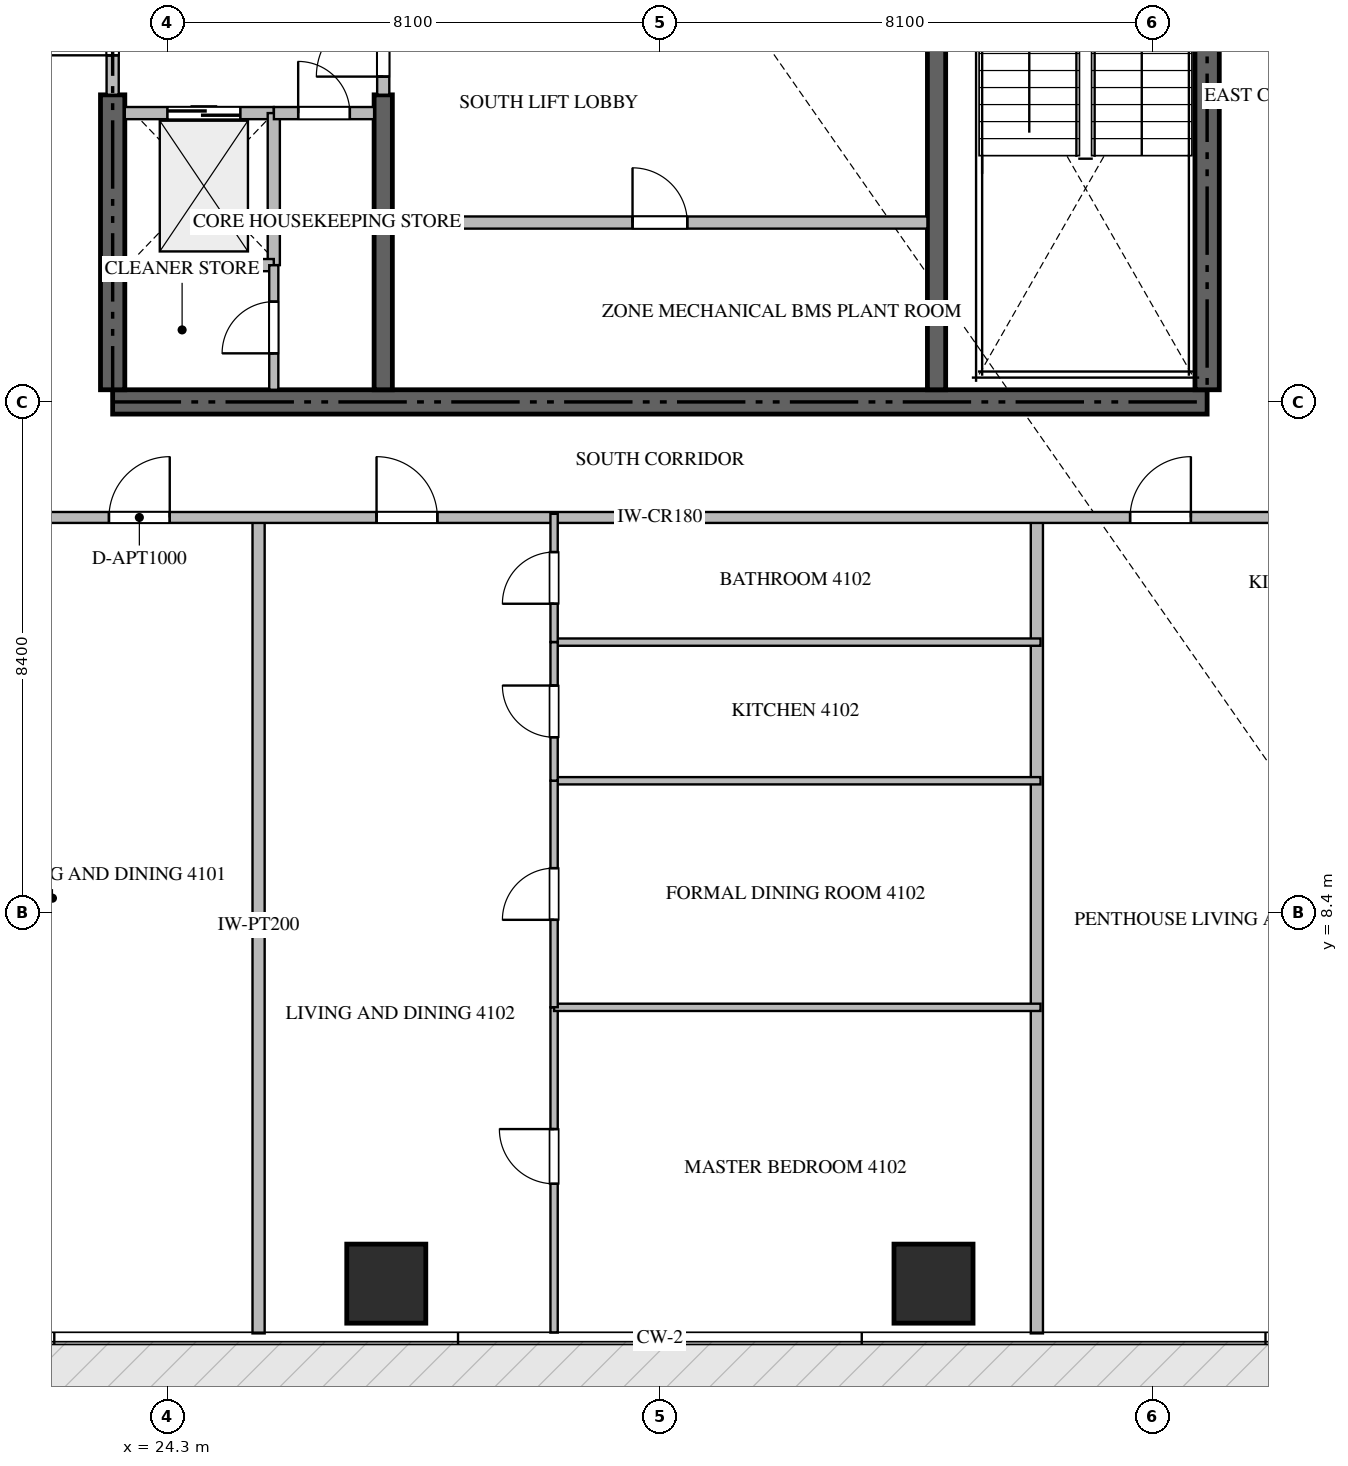
"""IFC4 building model, lengths in metres.
Left out: names, types, materials, properties, quantities, classifications, styles, units other than length and angle.
Written with IfcOpenShell. Run it as: python <this file> out.ifc"""

import sys

from ifc_helpers import new_model, si_unit, direction, frame, frame_2d, origin, origin_2d, place, context, subcontext, project, spatial, rectangle, extrude, source, transform, mapped, element, fill, save


model = new_model("IFC4")
c1 = context("Model", 3, precision=1e-05, world=origin(), true_north=direction((0.0, 1.0)))
c2 = subcontext(c1, "Body", "Model", "MODEL_VIEW")
j1 = project(units=[si_unit("LENGTHUNIT", "METRE"), si_unit("PLANEANGLEUNIT", "RADIAN")], contexts=[c1])
p1 = place(None, origin())
s1 = spatial("IfcSite", under=j1, at=p1, CompositionType="ELEMENT")
p2 = place(p1, origin())
s2 = spatial("IfcBuilding", under=s1, at=p2, CompositionType="ELEMENT")
p3 = place(p2, frame((0.0, 0.0, 165.15)))
s3 = spatial("IfcBuildingStorey", under=s2, at=p3, CompositionType="ELEMENT", Elevation=165.15)
p4 = place(p3, frame((23.4, 16.8, -0.26), z_axis=(0.0, 0.0, 1.0), x_axis=(1.0, 0.0, 0.0)))
e1 = element("IfcWall", 1, at=p4, inside=s3, PredefinedType="SHEAR", context=c2, shape_type="SweptSolid", body=[
    extrude(rectangle(XDim=18.0, YDim=0.4, at=frame_2d((9.0, 0.0))), origin(), (0.0, 0.0, 1.0), 3.748),
])
p5 = place(p3, frame((23.4, 17.0, -0.26), z_axis=(0.0, 0.0, 1.0), x_axis=(0.0, 1.0, 0.0)))
e2 = element("IfcWall", 2, at=p5, inside=s3, PredefinedType="SHEAR", context=c2, shape_type="SweptSolid", body=[
    extrude(rectangle(XDim=4.85, YDim=0.4, at=frame_2d((2.425, 0.0))), origin(), (0.0, 0.0, 1.0), 3.748),
])
p6 = place(p3, frame((41.4, 17.0, -0.26), z_axis=(0.0, 0.0, 1.0), x_axis=(0.0, 1.0, 0.0)))
e3 = element("IfcWall", 3, at=p6, inside=s3, PredefinedType="SHEAR", context=c2, shape_type="SweptSolid", body=[
    extrude(rectangle(XDim=8.35, YDim=0.4, at=frame_2d((4.175, 0.0))), origin(), (0.0, 0.0, 1.0), 3.748),
])
p7 = place(p3, frame((27.85, 17.0, -0.26), z_axis=(0.0, 0.0, 1.0), x_axis=(0.0, 1.0, 0.0)))
e4 = element("IfcWall", 4, at=p7, inside=s3, PredefinedType="SHEAR", context=c2, shape_type="SweptSolid", body=[
    extrude(rectangle(XDim=4.85, YDim=0.3, at=frame_2d((2.425, 0.0))), origin(), (0.0, 0.0, 1.0), 3.748),
])
p8 = place(p3, frame((36.95, 17.0, -0.26), z_axis=(0.0, 0.0, 1.0), x_axis=(0.0, 1.0, 0.0)))
e5 = element("IfcWall", 5, at=p8, inside=s3, PredefinedType="SHEAR", context=c2, shape_type="SweptSolid", body=[
    extrude(rectangle(XDim=8.35, YDim=0.3, at=frame_2d((4.175, 0.0))), origin(), (0.0, 0.0, 1.0), 3.748),
])
m1 = source(origin(), c2, "Body", "SweptSolid", [
    extrude(rectangle(XDim=1.3, YDim=1.3, at=origin_2d()), origin(), (0.0, 0.0, 1.0), 3.75),
])
for number, where, z_axis, x_axis in (
    (6, (27.9, 2.3, -0.26), (0.0, 0.0, 1.0), (1.0, 0.0, 0.0)),
    (7, (36.9, 2.3, -0.26), (0.0, 0.0, 1.0), (1.0, 0.0, 0.0)),
):
    element("IfcColumn", number, at=place(p3, frame(where, z_axis=z_axis, x_axis=x_axis)), inside=s3, PredefinedType="COLUMN", context=c2, shape_type="MappedRepresentation", body=[
        mapped(m1, transform((0.0, 0.0, 0.0), scale=1.0)),
    ])
p9 = place(p3, frame((23.6, 21.55, 0.0), z_axis=(0.0, 0.0, 1.0), x_axis=(1.0, 0.0, 0.0)))
e8 = element("IfcWall", 8, at=p9, inside=s3, PredefinedType="STANDARD", context=c2, shape_type="SweptSolid", body=[
    extrude(rectangle(XDim=2.45, YDim=0.2, at=frame_2d((1.225, 0.0))), origin(), (0.0, 0.0, 1.0), 3.49),
])
p10 = place(p9, frame((0.7, 0.0, 0.0)))
e9 = element("IfcOpeningElement", 9, at=p10, cuts=e8, PredefinedType="OPENING", context=c2, shape_type="SweptSolid", body=[
    extrude(rectangle(XDim=1.2, YDim=2.2, at=frame_2d((0.6, 1.1))), frame((0.0, 0.11, 0.0), z_axis=(0.0, -1.0, 0.0), x_axis=(1.0, 0.0, 0.0)), (0.0, 0.0, 1.0), 0.22),
])
p11 = place(p3, frame((26.05, 19.05, 0.0), z_axis=(0.0, 0.0, 1.0), x_axis=(0.0, 1.0, 0.0)))
e10 = element("IfcWall", 10, at=p11, inside=s3, PredefinedType="STANDARD", context=c2, shape_type="SweptSolid", body=[
    extrude(rectangle(XDim=2.5, YDim=0.2, at=frame_2d((1.25, 0.0))), origin(), (0.0, 0.0, 1.0), 3.49),
])
p12 = place(p3, frame((23.6, 19.05, 0.0), z_axis=(0.0, 0.0, 1.0), x_axis=(1.0, 0.0, 0.0)))
e11 = element("IfcWall", 11, at=p12, inside=s3, PredefinedType="STANDARD", context=c2, shape_type="SweptSolid", body=[
    extrude(rectangle(XDim=2.45, YDim=0.2, at=frame_2d((1.225, 0.0))), origin(), (0.0, 0.0, 1.0), 3.49),
])
p13 = place(p3, frame((26.052, 21.55, 0.0), z_axis=(0.0, 0.0, 1.0), x_axis=(1.0, 0.0, 0.0)))
e12 = element("IfcWall", 12, at=p13, inside=s3, PredefinedType="STANDARD", context=c2, shape_type="SweptSolid", body=[
    extrude(rectangle(XDim=1.648, YDim=0.2, at=frame_2d((0.824, 0.0))), origin(), (0.0, 0.0, 1.0), 3.49),
])
p14 = place(p13, frame((0.399, 0.0, 0.0)))
e13 = element("IfcOpeningElement", 13, at=p14, cuts=e12, PredefinedType="OPENING", context=c2, shape_type="SweptSolid", body=[
    extrude(rectangle(XDim=0.85, YDim=2.1, at=frame_2d((0.425, 1.05))), frame((0.0, 0.11, 0.0), z_axis=(0.0, -1.0, 0.0), x_axis=(1.0, 0.0, 0.0)), (0.0, 0.0, 1.0), 0.22),
])
p15 = place(p3, frame((23.4, 21.852, 0.0), z_axis=(0.0, 0.0, 1.0), x_axis=(0.0, 1.0, 0.0)))
e14 = element("IfcWall", 14, at=p15, inside=s3, PredefinedType="STANDARD", context=c2, shape_type="SweptSolid", body=[
    extrude(rectangle(XDim=2.396, YDim=0.2, at=frame_2d((1.198, 0.0))), origin(), (0.0, 0.0, 1.0), 3.49),
])
p16 = place(p15, frame((0.648, 0.0, 0.0)))
e15 = element("IfcOpeningElement", 15, at=p16, cuts=e14, PredefinedType="OPENING", context=c2, shape_type="SweptSolid", body=[
    extrude(rectangle(XDim=1.1, YDim=2.15, at=frame_2d((0.55, 1.075))), frame((0.0, 0.11, 0.0), z_axis=(0.0, -1.0, 0.0), x_axis=(1.0, 0.0, 0.0)), (0.0, 0.0, 1.0), 0.22),
])
p17 = place(p3, frame((27.85, 21.852, 0.0), z_axis=(0.0, 0.0, 1.0), x_axis=(0.0, 1.0, 0.0)))
e16 = element("IfcWall", 16, at=p17, inside=s3, PredefinedType="STANDARD", context=c2, shape_type="SweptSolid", body=[
    extrude(rectangle(XDim=1.696, YDim=0.2, at=frame_2d((0.848, 0.0))), origin(), (0.0, 0.0, 1.0), 3.49),
])
p18 = place(p17, frame((0.298, 0.0, 0.0)))
e17 = element("IfcOpeningElement", 17, at=p18, cuts=e16, PredefinedType="OPENING", context=c2, shape_type="SweptSolid", body=[
    extrude(rectangle(XDim=1.1, YDim=2.15, at=frame_2d((0.55, 1.075))), frame((0.0, 0.11, 0.0), z_axis=(0.0, -1.0, 0.0), x_axis=(1.0, 0.0, 0.0)), (0.0, 0.0, 1.0), 0.22),
])
p19 = place(p3, frame((26.05, 17.0, 0.0), z_axis=(0.0, 0.0, 1.0), x_axis=(0.0, 1.0, 0.0)))
e18 = element("IfcWall", 18, at=p19, inside=s3, PredefinedType="PARTITIONING", context=c2, shape_type="SweptSolid", body=[
    extrude(rectangle(XDim=2.048, YDim=0.15, at=frame_2d((1.024, 0.0))), origin(), (0.0, 0.0, 1.0), 3.49),
])
p20 = place(p19, frame((0.599, 0.0, 0.0)))
e19 = element("IfcOpeningElement", 19, at=p20, cuts=e18, PredefinedType="OPENING", context=c2, shape_type="SweptSolid", body=[
    extrude(rectangle(XDim=0.85, YDim=2.1, at=frame_2d((0.425, 1.05))), frame((0.0, 0.085, 0.0), z_axis=(0.0, -1.0, 0.0), x_axis=(1.0, 0.0, 0.0)), (0.0, 0.0, 1.0), 0.17),
])
p21 = place(p3, frame((28.0, 19.75, 0.0), z_axis=(0.0, 0.0, 1.0), x_axis=(1.0, 0.0, 0.0)))
e20 = element("IfcWall", 20, at=p21, inside=s3, PredefinedType="STANDARD", context=c2, shape_type="SweptSolid", body=[
    extrude(rectangle(XDim=8.8, YDim=0.2, at=frame_2d((4.4, 0.0))), origin(), (0.0, 0.0, 1.0), 3.49),
])
p22 = place(p21, frame((3.95, 0.0, 0.0)))
e21 = element("IfcOpeningElement", 21, at=p22, cuts=e20, PredefinedType="OPENING", context=c2, shape_type="SweptSolid", body=[
    extrude(rectangle(XDim=0.9, YDim=2.1, at=frame_2d((0.45, 1.05))), frame((0.0, 0.11, 0.0), z_axis=(0.0, -1.0, 0.0), x_axis=(1.0, 0.0, 0.0)), (0.0, 0.0, 1.0), 0.22),
])
for number, where, z_axis, x_axis in (
    (22, (25.8, 1.482, 0.0), (0.0, 0.0, 1.0), (0.0, 1.0, 0.0)),
    (23, (38.6, 1.482, 0.0), (0.0, 0.0, 1.0), (0.0, 1.0, 0.0)),
):
    element("IfcWall", number, at=place(p3, frame(where, z_axis=z_axis, x_axis=x_axis)), inside=s3, PredefinedType="PARTITIONING", context=c2, shape_type="SweptSolid", body=[
        extrude(rectangle(XDim=13.418, YDim=0.2, at=frame_2d((6.709, 0.0))), origin(), (0.0, 0.0, 1.0), 3.49),
    ])
p23 = place(p3, frame((20.952, 14.9, 0.0), z_axis=(0.0, 0.0, 1.0), x_axis=(1.0, 0.0, 0.0)))
e24 = element("IfcWall", 24, at=p23, inside=s3, PredefinedType="PARTITIONING", context=c2, shape_type="SweptSolid", body=[
    extrude(rectangle(XDim=22.896, YDim=0.18, at=frame_2d((11.448, 0.0))), origin(), (0.0, 0.0, 1.0), 3.49),
])
p24 = place(p23, frame((2.387, 0.0, 0.0)))
e25 = element("IfcOpeningElement", 25, at=p24, cuts=e24, PredefinedType="OPENING", context=c2, shape_type="SweptSolid", body=[
    extrude(rectangle(XDim=1.0, YDim=2.15, at=frame_2d((0.5, 1.075))), frame((0.0, 0.1, 0.0), z_axis=(0.0, -1.0, 0.0), x_axis=(1.0, 0.0, 0.0)), (0.0, 0.0, 1.0), 0.2),
])
p25 = place(p23, frame((6.788, 0.0, 0.0)))
e26 = element("IfcOpeningElement", 26, at=p25, cuts=e24, PredefinedType="OPENING", context=c2, shape_type="SweptSolid", body=[
    extrude(rectangle(XDim=1.0, YDim=2.15, at=frame_2d((0.5, 1.075))), frame((0.0, 0.1, 0.0), z_axis=(0.0, -1.0, 0.0), x_axis=(1.0, 0.0, 0.0)), (0.0, 0.0, 1.0), 0.2),
])
p26 = place(p23, frame((19.181, 0.0, 0.0)))
e27 = element("IfcOpeningElement", 27, at=p26, cuts=e24, PredefinedType="OPENING", context=c2, shape_type="SweptSolid", body=[
    extrude(rectangle(XDim=1.0, YDim=2.15, at=frame_2d((0.5, 1.075))), frame((0.0, 0.1, 0.0), z_axis=(0.0, -1.0, 0.0), x_axis=(1.0, 0.0, 0.0)), (0.0, 0.0, 1.0), 0.2),
])
p27 = place(p3, frame((30.66, 1.495, 0.0), z_axis=(0.0, 0.0, 1.0), x_axis=(0.0, 1.0, 0.0)))
e28 = element("IfcWall", 28, at=p27, inside=s3, PredefinedType="PARTITIONING", context=c2, shape_type="SweptSolid", body=[
    extrude(rectangle(XDim=5.349, YDim=0.12, at=frame_2d((2.674, 0.0))), origin(), (0.0, 0.0, 1.0), 3.49),
])
p28 = place(p27, frame((2.447, 0.0, 0.0)))
e29 = element("IfcOpeningElement", 29, at=p28, cuts=e28, PredefinedType="OPENING", context=c2, shape_type="SweptSolid", body=[
    extrude(rectangle(XDim=0.9, YDim=2.1, at=frame_2d((0.45, 1.05))), frame((0.0, 0.07, 0.0), z_axis=(0.0, -1.0, 0.0), x_axis=(1.0, 0.0, 0.0)), (0.0, 0.0, 1.0), 0.14),
])
for number, where, z_axis, x_axis in (
    (30, (30.66, 6.844, 0.0), (0.0, 0.0, 1.0), (1.0, 0.0, 0.0)),
    (31, (30.66, 10.57, 0.0), (0.0, 0.0, 1.0), (1.0, 0.0, 0.0)),
    (32, (30.66, 12.85, 0.0), (0.0, 0.0, 1.0), (1.0, 0.0, 0.0)),
):
    element("IfcWall", number, at=place(p3, frame(where, z_axis=z_axis, x_axis=x_axis)), inside=s3, PredefinedType="PARTITIONING", context=c2, shape_type="SweptSolid", body=[
        extrude(rectangle(XDim=8.0, YDim=0.12, at=frame_2d((4.0, 0.0))), origin(), (0.0, 0.0, 1.0), 3.49),
    ])
p29 = place(p3, frame((30.66, 6.846, 0.0), z_axis=(0.0, 0.0, 1.0), x_axis=(0.0, 1.0, 0.0)))
e33 = element("IfcWall", 33, at=p29, inside=s3, PredefinedType="PARTITIONING", context=c2, shape_type="SweptSolid", body=[
    extrude(rectangle(XDim=3.724, YDim=0.12, at=frame_2d((1.862, 0.0))), origin(), (0.0, 0.0, 1.0), 3.49),
])
p30 = place(p29, frame((1.437, 0.0, 0.0)))
e34 = element("IfcOpeningElement", 34, at=p30, cuts=e33, PredefinedType="OPENING", context=c2, shape_type="SweptSolid", body=[
    extrude(rectangle(XDim=0.85, YDim=2.1, at=frame_2d((0.425, 1.05))), frame((0.0, 0.07, 0.0), z_axis=(0.0, -1.0, 0.0), x_axis=(1.0, 0.0, 0.0)), (0.0, 0.0, 1.0), 0.14),
])
p31 = place(p3, frame((30.66, 10.572, 0.0), z_axis=(0.0, 0.0, 1.0), x_axis=(0.0, 1.0, 0.0)))
e35 = element("IfcWall", 35, at=p31, inside=s3, PredefinedType="PARTITIONING", context=c2, shape_type="SweptSolid", body=[
    extrude(rectangle(XDim=2.278, YDim=0.12, at=frame_2d((1.139, 0.0))), origin(), (0.0, 0.0, 1.0), 3.49),
])
p32 = place(p31, frame((0.714, 0.0, 0.0)))
e36 = element("IfcOpeningElement", 36, at=p32, cuts=e35, PredefinedType="OPENING", context=c2, shape_type="SweptSolid", body=[
    extrude(rectangle(XDim=0.85, YDim=2.1, at=frame_2d((0.425, 1.05))), frame((0.0, 0.07, 0.0), z_axis=(0.0, -1.0, 0.0), x_axis=(1.0, 0.0, 0.0)), (0.0, 0.0, 1.0), 0.14),
])
p33 = place(p3, frame((30.66, 12.852, 0.0), z_axis=(0.0, 0.0, 1.0), x_axis=(0.0, 1.0, 0.0)))
e37 = element("IfcWall", 37, at=p33, inside=s3, PredefinedType="PARTITIONING", context=c2, shape_type="SweptSolid", body=[
    extrude(rectangle(XDim=2.108, YDim=0.12, at=frame_2d((1.054, 0.0))), origin(), (0.0, 0.0, 1.0), 3.49),
])
p34 = place(p33, frame((0.629, 0.0, 0.0)))
e38 = element("IfcOpeningElement", 38, at=p34, cuts=e37, PredefinedType="OPENING", context=c2, shape_type="SweptSolid", body=[
    extrude(rectangle(XDim=0.85, YDim=2.1, at=frame_2d((0.425, 1.05))), frame((0.0, 0.07, 0.0), z_axis=(0.0, -1.0, 0.0), x_axis=(1.0, 0.0, 0.0)), (0.0, 0.0, 1.0), 0.14),
])
m2 = source(origin(), c2, "Body", "SweptSolid", [
    extrude(rectangle(XDim=1.2, YDim=2.2, at=frame_2d((0.6, 1.1))), frame((0.0, 0.025, 0.0), z_axis=(0.0, -1.0, 0.0), x_axis=(1.0, 0.0, 0.0)), (0.0, 0.0, 1.0), 0.05),
])
p35 = place(p10, origin())
e39 = element("IfcDoor", 39, at=p35, inside=s3, OperationType="DOUBLE_DOOR_SLIDING", PredefinedType="DOOR", context=c2, shape_type="MappedRepresentation", body=[
    mapped(m2, transform((0.0, 0.0, 0.0), scale=1.0)),
])
fill(e9, e39)
m3 = source(origin(), c2, "Body", "SweptSolid", [
    extrude(rectangle(XDim=0.85, YDim=2.1, at=frame_2d((0.425, 1.05))), frame((0.0, 0.025, 0.0), z_axis=(0.0, -1.0, 0.0), x_axis=(1.0, 0.0, 0.0)), (0.0, 0.0, 1.0), 0.05),
])
p36 = place(p14, origin())
e40 = element("IfcDoor", 40, at=p36, inside=s3, OperationType="SINGLE_SWING_LEFT", PredefinedType="DOOR", context=c2, shape_type="MappedRepresentation", body=[
    mapped(m3, transform((0.0, 0.0, 0.0), scale=1.0)),
])
fill(e13, e40)
m4 = source(origin(), c2, "Body", "SweptSolid", [
    extrude(rectangle(XDim=1.1, YDim=2.15, at=frame_2d((0.55, 1.075))), frame((0.0, 0.025, 0.0), z_axis=(0.0, -1.0, 0.0), x_axis=(1.0, 0.0, 0.0)), (0.0, 0.0, 1.0), 0.05),
])
p37 = place(p16, origin())
e41 = element("IfcDoor", 41, at=p37, inside=s3, OperationType="SINGLE_SWING_LEFT", PredefinedType="DOOR", context=c2, shape_type="MappedRepresentation", body=[
    mapped(m4, transform((0.0, 0.0, 0.0), scale=1.0)),
])
fill(e15, e41)
p38 = place(p18, origin())
e42 = element("IfcDoor", 42, at=p38, inside=s3, OperationType="SINGLE_SWING_LEFT", PredefinedType="DOOR", context=c2, shape_type="MappedRepresentation", body=[
    mapped(m4, transform((0.0, 0.0, 0.0), scale=1.0)),
])
fill(e17, e42)
p39 = place(p20, origin())
e43 = element("IfcDoor", 43, at=p39, inside=s3, OperationType="SINGLE_SWING_LEFT", PredefinedType="DOOR", context=c2, shape_type="MappedRepresentation", body=[
    mapped(m3, transform((0.0, 0.0, 0.0), scale=1.0)),
])
fill(e19, e43)
m5 = source(origin(), c2, "Body", "SweptSolid", [
    extrude(rectangle(XDim=0.9, YDim=2.1, at=frame_2d((0.45, 1.05))), frame((0.0, 0.025, 0.0), z_axis=(0.0, -1.0, 0.0), x_axis=(1.0, 0.0, 0.0)), (0.0, 0.0, 1.0), 0.05),
])
p40 = place(p22, origin())
e44 = element("IfcDoor", 44, at=p40, inside=s3, OperationType="SINGLE_SWING_LEFT", PredefinedType="DOOR", context=c2, shape_type="MappedRepresentation", body=[
    mapped(m5, transform((0.0, 0.0, 0.0), scale=1.0)),
])
fill(e21, e44)
m6 = source(origin(), c2, "Body", "SweptSolid", [
    extrude(rectangle(XDim=1.0, YDim=2.15, at=frame_2d((0.5, 1.075))), frame((0.0, 0.025, 0.0), z_axis=(0.0, -1.0, 0.0), x_axis=(1.0, 0.0, 0.0)), (0.0, 0.0, 1.0), 0.05),
])
p41 = place(p24, origin())
e45 = element("IfcDoor", 45, at=p41, inside=s3, OperationType="SINGLE_SWING_RIGHT", PredefinedType="DOOR", context=c2, shape_type="MappedRepresentation", body=[
    mapped(m6, transform((0.0, 0.0, 0.0), scale=1.0)),
])
fill(e25, e45)
p42 = place(p25, origin())
e46 = element("IfcDoor", 46, at=p42, inside=s3, OperationType="SINGLE_SWING_LEFT", PredefinedType="DOOR", context=c2, shape_type="MappedRepresentation", body=[
    mapped(m6, transform((0.0, 0.0, 0.0), scale=1.0)),
])
fill(e26, e46)
p43 = place(p26, origin())
e47 = element("IfcDoor", 47, at=p43, inside=s3, OperationType="SINGLE_SWING_RIGHT", PredefinedType="DOOR", context=c2, shape_type="MappedRepresentation", body=[
    mapped(m6, transform((0.0, 0.0, 0.0), scale=1.0)),
])
fill(e27, e47)
p44 = place(p28, origin())
e48 = element("IfcDoor", 48, at=p44, inside=s3, OperationType="SINGLE_SWING_RIGHT", PredefinedType="DOOR", context=c2, shape_type="MappedRepresentation", body=[
    mapped(m5, transform((0.0, 0.0, 0.0), scale=1.0)),
])
fill(e29, e48)
p45 = place(p30, origin())
e49 = element("IfcDoor", 49, at=p45, inside=s3, OperationType="SINGLE_SWING_LEFT", PredefinedType="DOOR", context=c2, shape_type="MappedRepresentation", body=[
    mapped(m3, transform((0.0, 0.0, 0.0), scale=1.0)),
])
fill(e34, e49)
p46 = place(p32, origin())
e50 = element("IfcDoor", 50, at=p46, inside=s3, OperationType="SINGLE_SWING_RIGHT", PredefinedType="DOOR", context=c2, shape_type="MappedRepresentation", body=[
    mapped(m3, transform((0.0, 0.0, 0.0), scale=1.0)),
])
fill(e36, e50)
p47 = place(p34, origin())
e51 = element("IfcDoor", 51, at=p47, inside=s3, OperationType="SINGLE_SWING_LEFT", PredefinedType="DOOR", context=c2, shape_type="MappedRepresentation", body=[
    mapped(m3, transform((0.0, 0.0, 0.0), scale=1.0)),
])
fill(e38, e51)
save(model, sys.argv[1])
